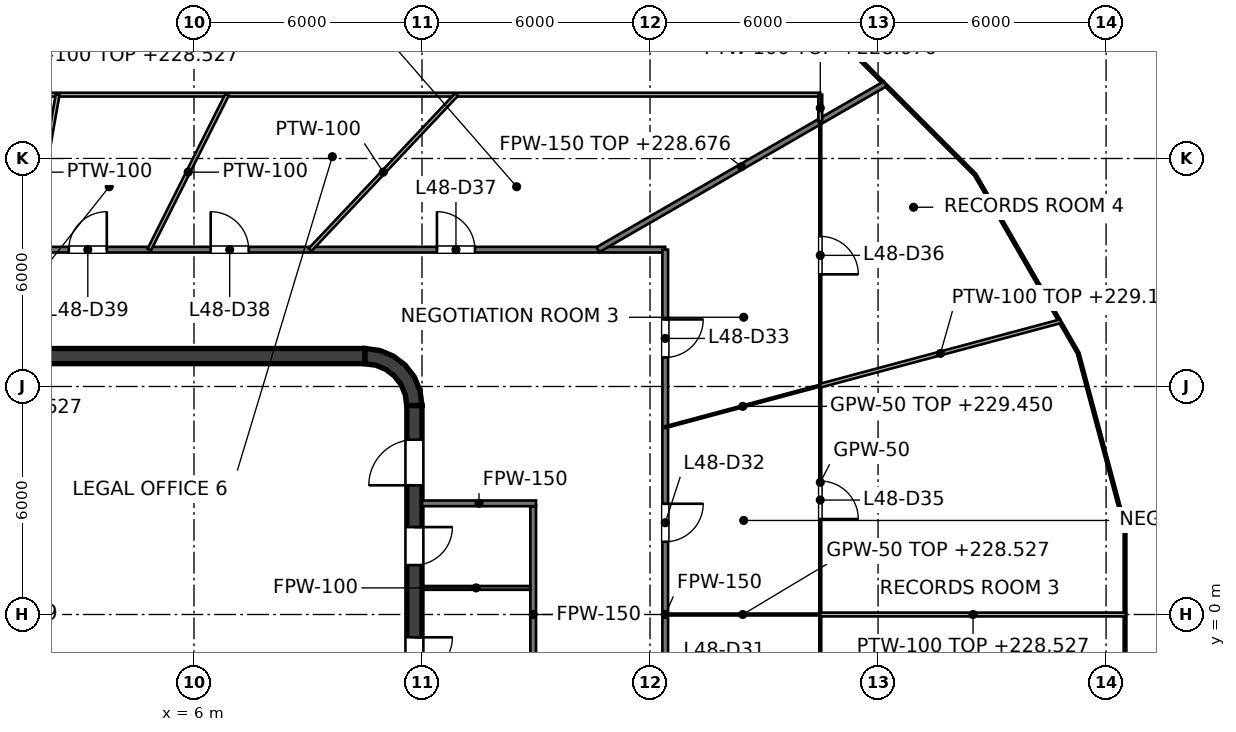
"""IFC4 building model, lengths in metres.
Left out: names, types, materials, properties, quantities, classifications, styles, units other than length and angle.
Written with IfcOpenShell. Run it as: python <this file> out.ifc"""

import sys

from ifc_helpers import new_model, si_unit, direction, frame, frame_2d, origin, place, context, subcontext, project, spatial, polyline, rectangle, outline, extrude, element, fill, save


model = new_model("IFC4")
c1 = context("Model", 3, precision=1e-05, world=origin(), true_north=direction((0.0, 1.0)))
c2 = subcontext(c1, "Body", "Model", "MODEL_VIEW")
j1 = project(units=[si_unit("LENGTHUNIT", "METRE"), si_unit("PLANEANGLEUNIT", "RADIAN")], contexts=[c1])
p1 = place(None, origin())
s1 = spatial("IfcSite", under=j1, at=p1, CompositionType="ELEMENT")
p2 = place(p1, origin())
s2 = spatial("IfcBuilding", under=s1, at=p2, CompositionType="ELEMENT")
p3 = place(p2, frame((0.0, 0.0, 225.6)))
s3 = spatial("IfcBuildingStorey", under=s2, at=p3, CompositionType="ELEMENT", Elevation=225.6)
p4 = place(p3, frame((-10.5, 6.8, 0.0), z_axis=(0.0, 0.0, 1.0), x_axis=(1.0, 0.0, 0.0)))
e1 = element("IfcWall", 1, at=p4, inside=s3, PredefinedType="SHEAR", context=c2, shape_type="SweptSolid", body=[
    extrude(rectangle(XDim=21.0, YDim=0.4, at=frame_2d((10.5, 0.0))), origin(), (0.0, 0.0, 1.0), 4.0),
])
p5 = place(p3, frame((11.8, -5.5, 0.0), z_axis=(0.0, 0.0, 1.0), x_axis=(0.0, 1.0, 0.0)))
e2 = element("IfcWall", 2, at=p5, inside=s3, PredefinedType="SHEAR", context=c2, shape_type="SweptSolid", body=[
    extrude(rectangle(XDim=11.0, YDim=0.4, at=frame_2d((5.5, 0.0))), origin(), (0.0, 0.0, 1.0), 4.0),
])
p6 = place(p5, frame((3.9, 0.0, 0.0)))
e3 = element("IfcOpeningElement", 3, at=p6, cuts=e2, PredefinedType="OPENING", context=c2, shape_type="SweptSolid", body=[
    extrude(rectangle(XDim=1.0, YDim=2.1, at=frame_2d((0.5, 1.05))), frame((0.0, 0.2, 0.0), z_axis=(0.0, -1.0, 0.0), x_axis=(1.0, 0.0, 0.0)), (0.0, 0.0, 1.0), 0.4),
])
p7 = place(p5, frame((6.8, 0.0, 0.0)))
e4 = element("IfcOpeningElement", 4, at=p7, cuts=e2, PredefinedType="OPENING", context=c2, shape_type="SweptSolid", body=[
    extrude(rectangle(XDim=1.0, YDim=2.1, at=frame_2d((0.5, 1.05))), frame((0.0, 0.2, 0.0), z_axis=(0.0, -1.0, 0.0), x_axis=(1.0, 0.0, 0.0)), (0.0, 0.0, 1.0), 0.4),
])
p8 = place(p5, frame((0.9, 0.0, 0.0)))
e5 = element("IfcOpeningElement", 5, at=p8, cuts=e2, PredefinedType="OPENING", context=c2, shape_type="SweptSolid", body=[
    extrude(rectangle(XDim=1.2, YDim=2.1, at=frame_2d((0.6, 1.05))), frame((0.0, 0.2, 0.0), z_axis=(0.0, -1.0, 0.0), x_axis=(1.0, 0.0, 0.0)), (0.0, 0.0, 1.0), 0.4),
])
p9 = place(p5, frame((8.9, 0.0, 0.0)))
e6 = element("IfcOpeningElement", 6, at=p9, cuts=e2, PredefinedType="OPENING", context=c2, shape_type="SweptSolid", body=[
    extrude(rectangle(XDim=1.2, YDim=2.1, at=frame_2d((0.6, 1.05))), frame((0.0, 0.2, 0.0), z_axis=(0.0, -1.0, 0.0), x_axis=(1.0, 0.0, 0.0)), (0.0, 0.0, 1.0), 0.4),
])
p10 = place(p3, origin())
e7 = element("IfcWall", 7, at=p10, inside=s3, PredefinedType="SHEAR", context=c2, shape_type="SweptSolid", body=[
    extrude(outline(polyline([(10.5, 7.0), (10.5, 6.596), (10.784, 6.559), (11.048, 6.45), (11.275, 6.275), (11.45, 6.048), (11.559, 5.784), (11.596, 5.5), (12.0, 5.5), (11.949, 5.888), (11.799, 6.25), (11.561, 6.561), (11.25, 6.799), (10.888, 6.949), (10.5, 7.0)])), origin(), (0.0, 0.0, 1.0), 4.0),
])
p11 = place(p3, frame((9.0, 4.1, 0.0), z_axis=(0.0, 0.0, 1.0), x_axis=(0.0, 1.0, 0.0)))
e8 = element("IfcWall", 8, at=p11, inside=s3, PredefinedType="SOLIDWALL", context=c2, shape_type="SweptSolid", body=[
    extrude(rectangle(XDim=2.5, YDim=0.25, at=frame_2d((1.25, 0.0))), origin(), (0.0, 0.0, 1.0), 3.85),
])
p12 = place(p11, frame((0.65, 0.0, 0.0)))
e9 = element("IfcOpeningElement", 9, at=p12, cuts=e8, PredefinedType="OPENING", context=c2, shape_type="SweptSolid", body=[
    extrude(rectangle(XDim=1.2, YDim=2.1, at=frame_2d((0.6, 1.05))), frame((0.0, 0.125, 0.0), z_axis=(0.0, -1.0, 0.0), x_axis=(1.0, 0.0, 0.0)), (0.0, 0.0, 1.0), 0.25),
])
p13 = place(p3, frame((3.15, 4.1, 0.0), z_axis=(0.0, 0.0, 1.0), x_axis=(0.0, 1.0, 0.0)))
e10 = element("IfcWall", 10, at=p13, inside=s3, PredefinedType="SOLIDWALL", context=c2, shape_type="SweptSolid", body=[
    extrude(rectangle(XDim=2.5, YDim=0.25, at=frame_2d((1.25, 0.0))), origin(), (0.0, 0.0, 1.0), 3.85),
])
p14 = place(p3, frame((0.775, 1.525, 0.0), z_axis=(0.0, 0.0, 1.0), x_axis=(1.0, 0.0, 0.0)))
e11 = element("IfcWall", 11, at=p14, inside=s3, PredefinedType="SOLIDWALL", context=c2, shape_type="SweptSolid", body=[
    extrude(rectangle(XDim=8.35, YDim=0.25, at=frame_2d((4.175, 0.0))), origin(), (0.0, 0.0, 1.0), 3.85),
])
p15 = place(p14, frame((0.925, 0.0, 0.0)))
e12 = element("IfcOpeningElement", 12, at=p15, cuts=e11, PredefinedType="OPENING", context=c2, shape_type="SweptSolid", body=[
    extrude(rectangle(XDim=1.1, YDim=2.1, at=frame_2d((0.55, 1.05))), frame((0.0, 0.125, 0.0), z_axis=(0.0, -1.0, 0.0), x_axis=(1.0, 0.0, 0.0)), (0.0, 0.0, 1.0), 0.25),
])
p16 = place(p14, frame((3.625, 0.0, 0.0)))
e13 = element("IfcOpeningElement", 13, at=p16, cuts=e11, PredefinedType="OPENING", context=c2, shape_type="SweptSolid", body=[
    extrude(rectangle(XDim=1.1, YDim=2.1, at=frame_2d((0.55, 1.05))), frame((0.0, 0.125, 0.0), z_axis=(0.0, -1.0, 0.0), x_axis=(1.0, 0.0, 0.0)), (0.0, 0.0, 1.0), 0.25),
])
p17 = place(p14, frame((6.325, 0.0, 0.0)))
e14 = element("IfcOpeningElement", 14, at=p17, cuts=e11, PredefinedType="OPENING", context=c2, shape_type="SweptSolid", body=[
    extrude(rectangle(XDim=1.1, YDim=2.1, at=frame_2d((0.55, 1.05))), frame((0.0, 0.125, 0.0), z_axis=(0.0, -1.0, 0.0), x_axis=(1.0, 0.0, 0.0)), (0.0, 0.0, 1.0), 0.25),
])
p18 = place(p3, frame((0.775, 3.975, 0.0), z_axis=(0.0, 0.0, 1.0), x_axis=(1.0, 0.0, 0.0)))
e15 = element("IfcWall", 15, at=p18, inside=s3, PredefinedType="SOLIDWALL", context=c2, shape_type="SweptSolid", body=[
    extrude(rectangle(XDim=8.35, YDim=0.25, at=frame_2d((4.175, 0.0))), origin(), (0.0, 0.0, 1.0), 3.85),
])
for number, where, z_axis, x_axis in (
    (16, (9.0, 1.65, 0.0), (0.0, 0.0, 1.0), (0.0, 1.0, 0.0)),
    (17, (6.3, 1.65, 0.0), (0.0, 0.0, 1.0), (0.0, 1.0, 0.0)),
    (18, (3.6, 1.65, 0.0), (0.0, 0.0, 1.0), (0.0, 1.0, 0.0)),
):
    element("IfcWall", number, at=place(p3, frame(where, z_axis=z_axis, x_axis=x_axis)), inside=s3, PredefinedType="SOLIDWALL", context=c2, shape_type="SweptSolid", body=[
        extrude(rectangle(XDim=2.2, YDim=0.25, at=frame_2d((1.1, 0.0))), origin(), (0.0, 0.0, 1.0), 3.85),
    ])
p19 = place(p3, frame((14.925, -2.85, 0.0), z_axis=(0.0, 0.0, 1.0), x_axis=(0.0, 1.0, 0.0)))
e19 = element("IfcWall", 19, at=p19, inside=s3, PredefinedType="PARTITIONING", context=c2, shape_type="SweptSolid", body=[
    extrude(rectangle(XDim=5.7, YDim=0.15, at=frame_2d((2.85, 0.0))), origin(), (0.0, 0.0, 1.0), 2.918),
])
p20 = place(p3, frame((12.0, 2.925, 0.0), z_axis=(0.0, 0.0, 1.0), x_axis=(1.0, 0.0, 0.0)))
e20 = element("IfcWall", 20, at=p20, inside=s3, PredefinedType="PARTITIONING", context=c2, shape_type="SweptSolid", body=[
    extrude(rectangle(XDim=3.0, YDim=0.15, at=frame_2d((1.5, 0.0))), origin(), (0.0, 0.0, 1.0), 2.918),
])
p21 = place(p3, frame((12.0, 0.7, 0.0), z_axis=(0.0, 0.0, 1.0), x_axis=(1.0, 0.0, 0.0)))
e21 = element("IfcWall", 21, at=p21, inside=s3, PredefinedType="PARTITIONING", context=c2, shape_type="SweptSolid", body=[
    extrude(rectangle(XDim=2.85, YDim=0.1, at=frame_2d((1.425, 0.0))), origin(), (0.0, 0.0, 1.0), 2.918),
])
p22 = place(p3, frame((-18.4, 9.6, 0.0), z_axis=(0.0, 0.0, 1.0), x_axis=(1.0, 0.0, 0.0)))
e22 = element("IfcWall", 22, at=p22, inside=s3, PredefinedType="PARTITIONING", context=c2, shape_type="SweptSolid", body=[
    extrude(rectangle(XDim=36.8, YDim=0.15, at=frame_2d((18.4, 0.0))), origin(), (0.0, 0.0, 1.0), 2.927),
])
p23 = place(p22, frame((30.793, 0.0, 0.0)))
e23 = element("IfcOpeningElement", 23, at=p23, cuts=e22, PredefinedType="OPENING", context=c2, shape_type="SweptSolid", body=[
    extrude(rectangle(XDim=1.0, YDim=2.1, at=frame_2d((0.5, 1.05))), frame((0.0, 0.075, 0.0), z_axis=(0.0, -1.0, 0.0), x_axis=(1.0, 0.0, 0.0)), (0.0, 0.0, 1.0), 0.15),
])
p24 = place(p22, frame((24.84, 0.0, 0.0)))
e24 = element("IfcOpeningElement", 24, at=p24, cuts=e22, PredefinedType="OPENING", context=c2, shape_type="SweptSolid", body=[
    extrude(rectangle(XDim=1.0, YDim=2.1, at=frame_2d((0.5, 1.05))), frame((0.0, 0.075, 0.0), z_axis=(0.0, -1.0, 0.0), x_axis=(1.0, 0.0, 0.0)), (0.0, 0.0, 1.0), 0.15),
])
p25 = place(p22, frame((21.106, 0.0, 0.0)))
e25 = element("IfcOpeningElement", 25, at=p25, cuts=e22, PredefinedType="OPENING", context=c2, shape_type="SweptSolid", body=[
    extrude(rectangle(XDim=1.0, YDim=2.1, at=frame_2d((0.5, 1.05))), frame((0.0, 0.075, 0.0), z_axis=(0.0, -1.0, 0.0), x_axis=(1.0, 0.0, 0.0)), (0.0, 0.0, 1.0), 0.15),
])
p26 = place(p22, frame((17.46, 0.0, 0.0)))
e26 = element("IfcOpeningElement", 26, at=p26, cuts=e22, PredefinedType="OPENING", context=c2, shape_type="SweptSolid", body=[
    extrude(rectangle(XDim=1.0, YDim=2.1, at=frame_2d((0.5, 1.05))), frame((0.0, 0.075, 0.0), z_axis=(0.0, -1.0, 0.0), x_axis=(1.0, 0.0, 0.0)), (0.0, 0.0, 1.0), 0.15),
])
p27 = place(p22, frame((13.497, 0.0, 0.0)))
e27 = element("IfcOpeningElement", 27, at=p27, cuts=e22, PredefinedType="OPENING", context=c2, shape_type="SweptSolid", body=[
    extrude(rectangle(XDim=1.0, YDim=2.1, at=frame_2d((0.5, 1.05))), frame((0.0, 0.075, 0.0), z_axis=(0.0, -1.0, 0.0), x_axis=(1.0, 0.0, 0.0)), (0.0, 0.0, 1.0), 0.15),
])
p28 = place(p22, frame((6.418, 0.0, 0.0)))
e28 = element("IfcOpeningElement", 28, at=p28, cuts=e22, PredefinedType="OPENING", context=c2, shape_type="SweptSolid", body=[
    extrude(rectangle(XDim=1.0, YDim=2.1, at=frame_2d((0.5, 1.05))), frame((0.0, 0.075, 0.0), z_axis=(0.0, -1.0, 0.0), x_axis=(1.0, 0.0, 0.0)), (0.0, 0.0, 1.0), 0.15),
])
p29 = place(p3, frame((16.628, 9.6, 0.0), z_axis=(0.0, 0.0, 1.0), x_axis=(0.865980240946, 0.500078216174, 0.0)))
e29 = element("IfcWall", 29, at=p29, inside=s3, PredefinedType="PARTITIONING", context=c2, shape_type="SweptSolid", body=[
    extrude(rectangle(XDim=8.732, YDim=0.15, at=frame_2d((4.366, 0.0))), origin(), (0.0, 0.0, 1.0), 3.076),
])
p30 = place(p3, frame((18.4, -9.6, 0.0), z_axis=(0.0, 0.0, 1.0), x_axis=(0.0, 1.0, 0.0)))
e30 = element("IfcWall", 30, at=p30, inside=s3, PredefinedType="PARTITIONING", context=c2, shape_type="SweptSolid", body=[
    extrude(rectangle(XDim=19.2, YDim=0.15, at=frame_2d((9.6, 0.0))), origin(), (0.0, 0.0, 1.0), 2.918),
])
p31 = place(p30, frame((1.835, 0.0, 0.0)))
e31 = element("IfcOpeningElement", 31, at=p31, cuts=e30, PredefinedType="OPENING", context=c2, shape_type="SweptSolid", body=[
    extrude(rectangle(XDim=1.0, YDim=2.1, at=frame_2d((0.5, 1.05))), frame((0.0, 0.075, 0.0), z_axis=(0.0, -1.0, 0.0), x_axis=(1.0, 0.0, 0.0)), (0.0, 0.0, 1.0), 0.15),
])
p32 = place(p30, frame((6.584, 0.0, 0.0)))
e32 = element("IfcOpeningElement", 32, at=p32, cuts=e30, PredefinedType="OPENING", context=c2, shape_type="SweptSolid", body=[
    extrude(rectangle(XDim=1.0, YDim=2.1, at=frame_2d((0.5, 1.05))), frame((0.0, 0.075, 0.0), z_axis=(0.0, -1.0, 0.0), x_axis=(1.0, 0.0, 0.0)), (0.0, 0.0, 1.0), 0.15),
])
p33 = place(p30, frame((11.514, 0.0, 0.0)))
e33 = element("IfcOpeningElement", 33, at=p33, cuts=e30, PredefinedType="OPENING", context=c2, shape_type="SweptSolid", body=[
    extrude(rectangle(XDim=1.0, YDim=2.1, at=frame_2d((0.5, 1.05))), frame((0.0, 0.075, 0.0), z_axis=(0.0, -1.0, 0.0), x_axis=(1.0, 0.0, 0.0)), (0.0, 0.0, 1.0), 0.15),
])
p34 = place(p30, frame((16.365, 0.0, 0.0)))
e34 = element("IfcOpeningElement", 34, at=p34, cuts=e30, PredefinedType="OPENING", context=c2, shape_type="SweptSolid", body=[
    extrude(rectangle(XDim=1.0, YDim=2.1, at=frame_2d((0.5, 1.05))), frame((0.0, 0.075, 0.0), z_axis=(0.0, -1.0, 0.0), x_axis=(1.0, 0.0, 0.0)), (0.0, 0.0, 1.0), 0.15),
])
p35 = place(p3, frame((18.4, 0.0, 0.0), z_axis=(0.0, 0.0, 1.0), x_axis=(1.0, 0.0, 0.0)))
e35 = element("IfcWall", 35, at=p35, inside=s3, PredefinedType="PARTITIONING", context=c2, shape_type="SweptSolid", body=[
    extrude(rectangle(XDim=4.08, YDim=0.05, at=frame_2d((2.04, 0.0))), origin(), (0.0, 0.0, 1.0), 2.927),
])
p36 = place(p3, frame((18.4, 4.93, 0.0), z_axis=(0.0, 0.0, 1.0), x_axis=(0.965881987453, 0.258982598479, 0.0)))
e36 = element("IfcWall", 36, at=p36, inside=s3, PredefinedType="PARTITIONING", context=c2, shape_type="SweptSolid", body=[
    extrude(rectangle(XDim=4.224, YDim=0.05, at=frame_2d((2.112, 0.0))), origin(), (0.0, 0.0, 1.0), 3.85),
])
p37 = place(p3, frame((22.48, -6.023, 0.0), z_axis=(0.0, 0.0, 1.0), x_axis=(0.0, 1.0, 0.0)))
e37 = element("IfcWall", 37, at=p37, inside=s3, PredefinedType="PARTITIONING", context=c2, shape_type="SweptSolid", body=[
    extrude(rectangle(XDim=19.002, YDim=0.05, at=frame_2d((9.501, 0.0))), origin(), (0.0, 0.0, 1.0), 2.918),
])
p38 = place(p37, frame((2.511, 0.0, 0.0)))
e38 = element("IfcOpeningElement", 38, at=p38, cuts=e37, PredefinedType="OPENING", context=c2, shape_type="SweptSolid", body=[
    extrude(rectangle(XDim=1.0, YDim=2.1, at=frame_2d((0.5, 1.05))), frame((0.0, 0.025, 0.0), z_axis=(0.0, -1.0, 0.0), x_axis=(1.0, 0.0, 0.0)), (0.0, 0.0, 1.0), 0.05),
])
p39 = place(p37, frame((8.534, 0.0, 0.0)))
e39 = element("IfcOpeningElement", 39, at=p39, cuts=e37, PredefinedType="OPENING", context=c2, shape_type="SweptSolid", body=[
    extrude(rectangle(XDim=1.0, YDim=2.1, at=frame_2d((0.5, 1.05))), frame((0.0, 0.025, 0.0), z_axis=(0.0, -1.0, 0.0), x_axis=(1.0, 0.0, 0.0)), (0.0, 0.0, 1.0), 0.05),
])
p40 = place(p37, frame((14.974, 0.0, 0.0)))
e40 = element("IfcOpeningElement", 40, at=p40, cuts=e37, PredefinedType="OPENING", context=c2, shape_type="SweptSolid", body=[
    extrude(rectangle(XDim=1.0, YDim=2.1, at=frame_2d((0.5, 1.05))), frame((0.0, 0.025, 0.0), z_axis=(0.0, -1.0, 0.0), x_axis=(1.0, 0.0, 0.0)), (0.0, 0.0, 1.0), 0.05),
])
p41 = place(p3, frame((22.48, 0.0, 0.0), z_axis=(0.0, 0.0, 1.0), x_axis=(1.0, 0.0, 0.0)))
e41 = element("IfcWall", 41, at=p41, inside=s3, PredefinedType="PARTITIONING", context=c2, shape_type="SweptSolid", body=[
    extrude(rectangle(XDim=8.039, YDim=0.1, at=frame_2d((4.02, 0.0))), origin(), (0.0, 0.0, 1.0), 2.927),
])
p42 = place(p3, frame((-22.48, 13.68, 0.0), z_axis=(0.0, 0.0, 1.0), x_axis=(1.0, 0.0, 0.0)))
e42 = element("IfcWall", 42, at=p42, inside=s3, PredefinedType="PARTITIONING", context=c2, shape_type="SweptSolid", body=[
    extrude(rectangle(XDim=44.96, YDim=0.1, at=frame_2d((22.48, 0.0))), origin(), (0.0, 0.0, 1.0), 2.927),
])
p43 = place(p42, frame((20.954, 0.0, 0.0)))
e43 = element("IfcOpeningElement", 43, at=p43, cuts=e42, PredefinedType="OPENING", context=c2, shape_type="SweptSolid", body=[
    extrude(rectangle(XDim=1.8, YDim=2.1, at=frame_2d((0.9, 1.05))), frame((0.0, 0.05, 0.0), z_axis=(0.0, -1.0, 0.0), x_axis=(1.0, 0.0, 0.0)), (0.0, 0.0, 1.0), 0.1),
])
p44 = place(p42, frame((6.348, 0.0, 0.0)))
e44 = element("IfcOpeningElement", 44, at=p44, cuts=e42, PredefinedType="OPENING", context=c2, shape_type="SweptSolid", body=[
    extrude(rectangle(XDim=0.9, YDim=2.1, at=frame_2d((0.45, 1.05))), frame((0.0, 0.05, 0.0), z_axis=(0.0, -1.0, 0.0), x_axis=(1.0, 0.0, 0.0)), (0.0, 0.0, 1.0), 0.1),
])
p45 = place(p3, frame((22.48, 6.023, 0.0), z_axis=(0.0, 0.0, 1.0), x_axis=(0.965904269097, 0.258899484243, 0.0)))
e45 = element("IfcWall", 45, at=p45, inside=s3, PredefinedType="PARTITIONING", context=c2, shape_type="SweptSolid", body=[
    extrude(rectangle(XDim=6.547, YDim=0.1, at=frame_2d((3.273, 0.0))), origin(), (0.0, 0.0, 1.0), 3.527),
])
p46 = place(p3, frame((9.057, 9.6, 0.0), z_axis=(0.0, 0.0, 1.0), x_axis=(0.686333382584, 0.727287073961, 0.0)))
e46 = element("IfcWall", 46, at=p46, inside=s3, PredefinedType="PARTITIONING", context=c2, shape_type="SweptSolid", body=[
    extrude(rectangle(XDim=5.61, YDim=0.1, at=frame_2d((2.805, 0.0))), origin(), (0.0, 0.0, 1.0), 3.85),
])
p47 = place(p3, frame((4.822, 9.6, 0.0), z_axis=(0.0, 0.0, 1.0), x_axis=(0.448817131352, 0.89362362469, 0.0)))
e47 = element("IfcWall", 47, at=p47, inside=s3, PredefinedType="PARTITIONING", context=c2, shape_type="SweptSolid", body=[
    extrude(rectangle(XDim=4.565, YDim=0.1, at=frame_2d((2.283, 0.0))), origin(), (0.0, 0.0, 1.0), 3.85),
])
p48 = place(p3, frame((1.693, 9.6, 0.0), z_axis=(0.0, 0.0, 1.0), x_axis=(0.173556717923, 0.984823875454, 0.0)))
e48 = element("IfcWall", 48, at=p48, inside=s3, PredefinedType="PARTITIONING", context=c2, shape_type="SweptSolid", body=[
    extrude(rectangle(XDim=4.143, YDim=0.1, at=frame_2d((2.071, 0.0))), origin(), (0.0, 0.0, 1.0), 3.85),
])
p49 = place(p3, frame((22.48, 12.979, 0.0), z_axis=(0.0, 0.0, 1.0), x_axis=(0.0, 1.0, 0.0)))
e49 = element("IfcWall", 49, at=p49, inside=s3, PredefinedType="PARTITIONING", context=c2, shape_type="SweptSolid", body=[
    extrude(rectangle(XDim=0.701, YDim=0.1, at=frame_2d((0.351, 0.0))), origin(), (0.0, 0.0, 1.0), 3.076),
])
p50 = place(p15, origin())
e50 = element("IfcDoor", 50, at=p50, inside=s3, OperationType="DOUBLE_DOOR_SLIDING", PredefinedType="DOOR", context=c2, shape_type="SweptSolid", body=[
    extrude(rectangle(XDim=1.1, YDim=2.1, at=frame_2d((0.55, 1.05))), frame((0.0, 0.025, 0.0), z_axis=(0.0, -1.0, 0.0), x_axis=(1.0, 0.0, 0.0)), (0.0, 0.0, 1.0), 0.05),
])
fill(e12, e50)
p51 = place(p16, origin())
e51 = element("IfcDoor", 51, at=p51, inside=s3, OperationType="DOUBLE_DOOR_SLIDING", PredefinedType="DOOR", context=c2, shape_type="SweptSolid", body=[
    extrude(rectangle(XDim=1.1, YDim=2.1, at=frame_2d((0.55, 1.05))), frame((0.0, 0.025, 0.0), z_axis=(0.0, -1.0, 0.0), x_axis=(1.0, 0.0, 0.0)), (0.0, 0.0, 1.0), 0.05),
])
fill(e13, e51)
p52 = place(p17, origin())
e52 = element("IfcDoor", 52, at=p52, inside=s3, OperationType="DOUBLE_DOOR_SLIDING", PredefinedType="DOOR", context=c2, shape_type="SweptSolid", body=[
    extrude(rectangle(XDim=1.1, YDim=2.1, at=frame_2d((0.55, 1.05))), frame((0.0, 0.025, 0.0), z_axis=(0.0, -1.0, 0.0), x_axis=(1.0, 0.0, 0.0)), (0.0, 0.0, 1.0), 0.05),
])
fill(e14, e52)
p53 = place(p12, origin())
e53 = element("IfcDoor", 53, at=p53, inside=s3, OperationType="SINGLE_SWING_LEFT", PredefinedType="DOOR", context=c2, shape_type="SweptSolid", body=[
    extrude(rectangle(XDim=1.2, YDim=2.1, at=frame_2d((0.6, 1.05))), frame((0.0, 0.025, 0.0), z_axis=(0.0, -1.0, 0.0), x_axis=(1.0, 0.0, 0.0)), (0.0, 0.0, 1.0), 0.05),
])
fill(e9, e53)
p54 = place(p6, origin())
e54 = element("IfcDoor", 54, at=p54, inside=s3, OperationType="SINGLE_SWING_RIGHT", PredefinedType="DOOR", context=c2, shape_type="SweptSolid", body=[
    extrude(rectangle(XDim=1.0, YDim=2.1, at=frame_2d((0.5, 1.05))), frame((0.0, 0.025, 0.0), z_axis=(0.0, -1.0, 0.0), x_axis=(1.0, 0.0, 0.0)), (0.0, 0.0, 1.0), 0.05),
])
fill(e3, e54)
p55 = place(p7, origin())
e55 = element("IfcDoor", 55, at=p55, inside=s3, OperationType="SINGLE_SWING_RIGHT", PredefinedType="DOOR", context=c2, shape_type="SweptSolid", body=[
    extrude(rectangle(XDim=1.0, YDim=2.1, at=frame_2d((0.5, 1.05))), frame((0.0, 0.025, 0.0), z_axis=(0.0, -1.0, 0.0), x_axis=(1.0, 0.0, 0.0)), (0.0, 0.0, 1.0), 0.05),
])
fill(e4, e55)
p56 = place(p9, origin())
e56 = element("IfcDoor", 56, at=p56, inside=s3, OperationType="SINGLE_SWING_LEFT", PredefinedType="DOOR", context=c2, shape_type="SweptSolid", body=[
    extrude(rectangle(XDim=1.2, YDim=2.1, at=frame_2d((0.6, 1.05))), frame((0.0, 0.025, 0.0), z_axis=(0.0, -1.0, 0.0), x_axis=(1.0, 0.0, 0.0)), (0.0, 0.0, 1.0), 0.05),
])
fill(e6, e56)
p57 = place(p33, origin())
e57 = element("IfcDoor", 57, at=p57, inside=s3, OperationType="SINGLE_SWING_RIGHT", PredefinedType="DOOR", context=c2, shape_type="SweptSolid", body=[
    extrude(rectangle(XDim=1.0, YDim=2.1, at=frame_2d((0.5, 1.05))), frame((0.0, 0.025, 0.0), z_axis=(0.0, -1.0, 0.0), x_axis=(1.0, 0.0, 0.0)), (0.0, 0.0, 1.0), 0.05),
])
fill(e33, e57)
p58 = place(p34, origin())
e58 = element("IfcDoor", 58, at=p58, inside=s3, OperationType="SINGLE_SWING_RIGHT", PredefinedType="DOOR", context=c2, shape_type="SweptSolid", body=[
    extrude(rectangle(XDim=1.0, YDim=2.1, at=frame_2d((0.5, 1.05))), frame((0.0, 0.025, 0.0), z_axis=(0.0, -1.0, 0.0), x_axis=(1.0, 0.0, 0.0)), (0.0, 0.0, 1.0), 0.05),
])
fill(e34, e58)
p59 = place(p39, origin())
e59 = element("IfcDoor", 59, at=p59, inside=s3, OperationType="SINGLE_SWING_LEFT", PredefinedType="DOOR", context=c2, shape_type="SweptSolid", body=[
    extrude(rectangle(XDim=1.0, YDim=2.1, at=frame_2d((0.5, 1.05))), frame((0.0, 0.025, 0.0), z_axis=(0.0, -1.0, 0.0), x_axis=(1.0, 0.0, 0.0)), (0.0, 0.0, 1.0), 0.05),
])
fill(e39, e59)
p60 = place(p40, origin())
e60 = element("IfcDoor", 60, at=p60, inside=s3, OperationType="SINGLE_SWING_LEFT", PredefinedType="DOOR", context=c2, shape_type="SweptSolid", body=[
    extrude(rectangle(XDim=1.0, YDim=2.1, at=frame_2d((0.5, 1.05))), frame((0.0, 0.025, 0.0), z_axis=(0.0, -1.0, 0.0), x_axis=(1.0, 0.0, 0.0)), (0.0, 0.0, 1.0), 0.05),
])
fill(e40, e60)
p61 = place(p23, origin())
e61 = element("IfcDoor", 61, at=p61, inside=s3, OperationType="SINGLE_SWING_LEFT", PredefinedType="DOOR", context=c2, shape_type="SweptSolid", body=[
    extrude(rectangle(XDim=1.0, YDim=2.1, at=frame_2d((0.5, 1.05))), frame((0.0, 0.025, 0.0), z_axis=(0.0, -1.0, 0.0), x_axis=(1.0, 0.0, 0.0)), (0.0, 0.0, 1.0), 0.05),
])
fill(e23, e61)
p62 = place(p24, origin())
e62 = element("IfcDoor", 62, at=p62, inside=s3, OperationType="SINGLE_SWING_LEFT", PredefinedType="DOOR", context=c2, shape_type="SweptSolid", body=[
    extrude(rectangle(XDim=1.0, YDim=2.1, at=frame_2d((0.5, 1.05))), frame((0.0, 0.025, 0.0), z_axis=(0.0, -1.0, 0.0), x_axis=(1.0, 0.0, 0.0)), (0.0, 0.0, 1.0), 0.05),
])
fill(e24, e62)
p63 = place(p25, origin())
e63 = element("IfcDoor", 63, at=p63, inside=s3, OperationType="SINGLE_SWING_RIGHT", PredefinedType="DOOR", context=c2, shape_type="SweptSolid", body=[
    extrude(rectangle(XDim=1.0, YDim=2.1, at=frame_2d((0.5, 1.05))), frame((0.0, 0.025, 0.0), z_axis=(0.0, -1.0, 0.0), x_axis=(1.0, 0.0, 0.0)), (0.0, 0.0, 1.0), 0.05),
])
fill(e25, e63)
save(model, sys.argv[1])
